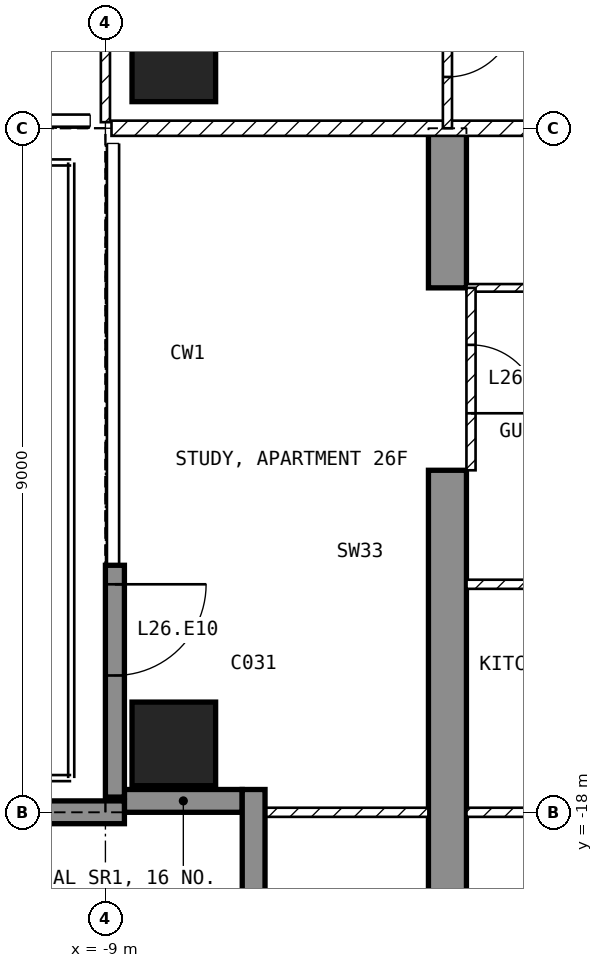
"""IFC4 building model, lengths in metres.
Left out: names, types, materials, properties, quantities, classifications, styles, units other than length and angle.
Written with IfcOpenShell. Run it as: python <this file> out.ifc"""

import sys

from ifc_helpers import new_model, si_unit, direction, frame, frame_2d, origin, origin_2d, place, context, subcontext, project, spatial, polyline, rectangle, outline, extrude, element, fill, save


model = new_model("IFC4")
c1 = context("Model", 3, precision=1e-05, world=origin(), true_north=direction((0.0, 1.0)))
c2 = subcontext(c1, "Body", "Model", "MODEL_VIEW")
j1 = project(units=[si_unit("LENGTHUNIT", "METRE"), si_unit("PLANEANGLEUNIT", "RADIAN")], contexts=[c1])
p1 = place(None, origin())
s1 = spatial("IfcSite", under=j1, at=p1, CompositionType="ELEMENT")
p2 = place(p1, origin())
s2 = spatial("IfcBuilding", under=s1, at=p2, CompositionType="ELEMENT")
p3 = place(p2, frame((0.0, 0.0, 112.9)))
s3 = spatial("IfcBuildingStorey", under=s2, at=p3, CompositionType="ELEMENT", Elevation=112.9)
for number, where, z_axis, x_axis in (
    (1, (-8.1, -17.1, -0.25), (0.0, 0.0, 1.0), (1.0, 0.0, 0.0)),
    (2, (-8.1, -8.1, -0.25), (0.0, 0.0, 1.0), (1.0, 0.0, 0.0)),
):
    element("IfcColumn", number, at=place(p3, frame(where, z_axis=z_axis, x_axis=x_axis)), inside=s3, PredefinedType="COLUMN", context=c2, shape_type="SweptSolid", body=[
        extrude(rectangle(XDim=1.1, YDim=1.1, at=origin_2d()), origin(), (0.0, 0.0, 1.0), 3.5),
    ])
p4 = place(p3, frame((-4.75, -20.15, -0.25), z_axis=(1.0, 0.0, 0.0), x_axis=(0.0, 1.0, 0.0)))
e3 = element("IfcWall", 3, at=p4, inside=s3, PredefinedType="SHEAR", context=c2, shape_type="SweptSolid", body=[
    extrude(outline(polyline([(0.0, 0.0), (6.65, 0.0), (6.65, 2.65), (9.05, 2.65), (9.05, 0.0), (11.15, 0.0), (11.15, 3.5), (0.0, 3.5), (0.0, 0.0)])), origin(), (0.0, 0.0, 1.0), 0.5),
])
p5 = place(p3, frame((-8.875, -14.75, 0.0), z_axis=(0.0, 0.0, 1.0), x_axis=(0.0, -1.0, 0.0)))
e4 = element("IfcWall", 4, at=p5, inside=s3, PredefinedType="SOLIDWALL", context=c2, shape_type="SweptSolid", body=[
    extrude(rectangle(XDim=3.05, YDim=0.25, at=frame_2d((1.525, 0.0))), origin(), (0.0, 0.0, 1.0), 3.25),
])
p6 = place(p5, frame((0.25, 0.0, 0.0)))
e5 = element("IfcOpeningElement", 5, at=p6, cuts=e4, PredefinedType="OPENING", context=c2, shape_type="SweptSolid", body=[
    extrude(rectangle(XDim=1.2, YDim=2.4, at=frame_2d((0.6, 1.2))), frame((0.0, 0.135, 0.0), z_axis=(0.0, -1.0, 0.0), x_axis=(1.0, 0.0, 0.0)), (0.0, 0.0, 1.0), 0.27),
])
p7 = place(p3, frame((-8.75, -17.85, 0.0), z_axis=(0.0, 0.0, 1.0), x_axis=(1.0, 0.0, 0.0)))
e6 = element("IfcWall", 6, at=p7, inside=s3, PredefinedType="SOLIDWALL", context=c2, shape_type="SweptSolid", body=[
    extrude(rectangle(XDim=1.55, YDim=0.3, at=frame_2d((0.775, 0.0))), origin(), (0.0, 0.0, 1.0), 3.25),
])
p8 = place(p3, frame((-7.05, -17.7, 0.0), z_axis=(0.0, 0.0, 1.0), x_axis=(0.0, -1.0, 0.0)))
e7 = element("IfcWall", 7, at=p8, inside=s3, PredefinedType="SOLIDWALL", context=c2, shape_type="SweptSolid", body=[
    extrude(rectangle(XDim=1.8, YDim=0.3, at=frame_2d((0.9, 0.0))), origin(), (0.0, 0.0, 1.0), 3.25),
])
p9 = place(p3, frame((-8.75, -18.0, 0.0), z_axis=(0.0, 0.0, 1.0), x_axis=(-1.0, 0.0, 0.0)))
e8 = element("IfcWall", 8, at=p9, inside=s3, PredefinedType="SOLIDWALL", context=c2, shape_type="SweptSolid", body=[
    extrude(rectangle(XDim=2.99, YDim=0.3, at=frame_2d((1.495, 0.0))), origin(), (0.0, 0.0, 1.0), 3.25),
])
p10 = place(p3, frame((8.92, -9.0, 0.0), z_axis=(0.0, 0.0, 1.0), x_axis=(-1.0, 0.0, 0.0)))
e9 = element("IfcWall", 9, at=p10, inside=s3, PredefinedType="PARTITIONING", context=c2, shape_type="SweptSolid", body=[
    extrude(rectangle(XDim=17.84, YDim=0.2, at=frame_2d((8.92, 0.0))), origin(), (0.0, 0.0, 1.0), 3.25),
])
p11 = place(p10, frame((8.42, 0.0, 0.0)))
e10 = element("IfcOpeningElement", 10, at=p11, cuts=e9, PredefinedType="OPENING", context=c2, shape_type="SweptSolid", body=[
    extrude(rectangle(XDim=1.0, YDim=2.1, at=frame_2d((0.5, 1.05))), frame((0.0, 0.11, 0.0), z_axis=(0.0, -1.0, 0.0), x_axis=(1.0, 0.0, 0.0)), (0.0, 0.0, 1.0), 0.22),
])
p12 = place(p3, frame((-9.0, -1.3, 0.0), z_axis=(0.0, 0.0, 1.0), x_axis=(0.0, -1.0, 0.0)))
e11 = element("IfcWall", 11, at=p12, inside=s3, PredefinedType="PARTITIONING", context=c2, shape_type="SweptSolid", body=[
    extrude(rectangle(XDim=7.62, YDim=0.12, at=frame_2d((3.81, 0.0))), origin(), (0.0, 0.0, 1.0), 3.25),
])
p13 = place(p12, frame((4.77, 0.0, 0.0)))
e12 = element("IfcOpeningElement", 12, at=p13, cuts=e11, PredefinedType="OPENING", context=c2, shape_type="SweptSolid", body=[
    extrude(rectangle(XDim=0.9, YDim=2.1, at=frame_2d((0.45, 1.05))), frame((0.0, 0.07, 0.0), z_axis=(0.0, -1.0, 0.0), x_axis=(1.0, 0.0, 0.0)), (0.0, 0.0, 1.0), 0.14),
])
p14 = place(p3, frame((-4.5, -6.75, 0.0), z_axis=(0.0, 0.0, 1.0), x_axis=(0.0, -1.0, 0.0)))
e13 = element("IfcWall", 13, at=p14, inside=s3, PredefinedType="PARTITIONING", context=c2, shape_type="SweptSolid", body=[
    extrude(rectangle(XDim=2.25, YDim=0.12, at=frame_2d((1.125, 0.0))), origin(), (0.0, 0.0, 1.0), 3.25),
])
p15 = place(p14, frame((0.675, 0.0, 0.0)))
e14 = element("IfcOpeningElement", 14, at=p15, cuts=e13, PredefinedType="OPENING", context=c2, shape_type="SweptSolid", body=[
    extrude(rectangle(XDim=0.9, YDim=2.1, at=frame_2d((0.45, 1.05))), frame((0.0, 0.07, 0.0), z_axis=(0.0, -1.0, 0.0), x_axis=(1.0, 0.0, 0.0)), (0.0, 0.0, 1.0), 0.14),
])
p16 = place(p3, frame((-2.1, -11.1, 0.0), z_axis=(0.0, 0.0, 1.0), x_axis=(-1.0, 0.0, 0.0)))
e15 = element("IfcWall", 15, at=p16, inside=s3, PredefinedType="PARTITIONING", context=c2, shape_type="SweptSolid", body=[
    extrude(rectangle(XDim=2.15, YDim=0.1, at=frame_2d((1.075, 0.0))), origin(), (0.0, 0.0, 1.0), 3.25),
])
p17 = place(p3, frame((-0.44, -15.0, 0.0), z_axis=(0.0, 0.0, 1.0), x_axis=(-1.0, 0.0, 0.0)))
e16 = element("IfcWall", 16, at=p17, inside=s3, PredefinedType="PARTITIONING", context=c2, shape_type="SweptSolid", body=[
    extrude(rectangle(XDim=3.81, YDim=0.12, at=frame_2d((1.905, 0.0))), origin(), (0.0, 0.0, 1.0), 3.25),
])
p18 = place(p3, frame((4.25, -18.0, 0.0), z_axis=(0.0, 0.0, 1.0), x_axis=(-1.0, 0.0, 0.0)))
e17 = element("IfcWall", 17, at=p18, inside=s3, PredefinedType="PARTITIONING", context=c2, shape_type="SweptSolid", body=[
    extrude(rectangle(XDim=8.5, YDim=0.12, at=frame_2d((4.25, 0.0))), origin(), (0.0, 0.0, 1.0), 3.25),
])
p19 = place(p18, frame((1.925, 0.0, 0.0)))
e18 = element("IfcOpeningElement", 18, at=p19, cuts=e17, PredefinedType="OPENING", context=c2, shape_type="SweptSolid", body=[
    extrude(rectangle(XDim=0.9, YDim=2.1, at=frame_2d((0.45, 1.05))), frame((0.0, 0.07, 0.0), z_axis=(0.0, -1.0, 0.0), x_axis=(1.0, 0.0, 0.0)), (0.0, 0.0, 1.0), 0.14),
])
p20 = place(p3, frame((-4.75, -18.0, 0.0), z_axis=(0.0, 0.0, 1.0), x_axis=(-1.0, 0.0, 0.0)))
e19 = element("IfcWall", 19, at=p20, inside=s3, PredefinedType="PARTITIONING", context=c2, shape_type="SweptSolid", body=[
    extrude(rectangle(XDim=2.37, YDim=0.12, at=frame_2d((1.185, 0.0))), origin(), (0.0, 0.0, 1.0), 3.25),
])
p21 = place(p3, frame((-4.19, -11.1, 0.0), z_axis=(0.0, 0.0, 1.0), x_axis=(0.0, -1.0, 0.0)))
e20 = element("IfcWall", 20, at=p21, inside=s3, PredefinedType="PARTITIONING", context=c2, shape_type="SweptSolid", body=[
    extrude(rectangle(XDim=2.4, YDim=0.12, at=frame_2d((1.2, 0.0))), origin(), (0.0, 0.0, 1.0), 2.4),
])
p22 = place(p21, frame((0.75, 0.0, 0.0)))
e21 = element("IfcOpeningElement", 21, at=p22, cuts=e20, PredefinedType="OPENING", context=c2, shape_type="SweptSolid", body=[
    extrude(rectangle(XDim=0.9, YDim=2.1, at=frame_2d((0.45, 1.05))), frame((0.0, 0.07, 0.0), z_axis=(0.0, -1.0, 0.0), x_axis=(1.0, 0.0, 0.0)), (0.0, 0.0, 1.0), 0.14),
])
p23 = place(p6, origin())
e22 = element("IfcDoor", 22, at=p23, inside=s3, OperationType="SINGLE_SWING_LEFT", PredefinedType="DOOR", context=c2, shape_type="SweptSolid", body=[
    extrude(rectangle(XDim=1.2, YDim=2.4, at=frame_2d((0.6, 1.2))), frame((0.0, 0.025, 0.0), z_axis=(0.0, -1.0, 0.0), x_axis=(1.0, 0.0, 0.0)), (0.0, 0.0, 1.0), 0.05),
])
fill(e5, e22)
p24 = place(p15, origin())
e23 = element("IfcDoor", 23, at=p24, inside=s3, OperationType="SINGLE_SWING_LEFT", PredefinedType="DOOR", context=c2, shape_type="SweptSolid", body=[
    extrude(rectangle(XDim=0.9, YDim=2.1, at=frame_2d((0.45, 1.05))), frame((0.0, 0.025, 0.0), z_axis=(0.0, -1.0, 0.0), x_axis=(1.0, 0.0, 0.0)), (0.0, 0.0, 1.0), 0.05),
])
fill(e14, e23)
p25 = place(p22, origin())
e24 = element("IfcDoor", 24, at=p25, inside=s3, OperationType="SINGLE_SWING_RIGHT", PredefinedType="DOOR", context=c2, shape_type="SweptSolid", body=[
    extrude(rectangle(XDim=0.9, YDim=2.1, at=frame_2d((0.45, 1.05))), frame((0.0, 0.025, 0.0), z_axis=(0.0, -1.0, 0.0), x_axis=(1.0, 0.0, 0.0)), (0.0, 0.0, 1.0), 0.05),
])
fill(e21, e24)
save(model, sys.argv[1])
